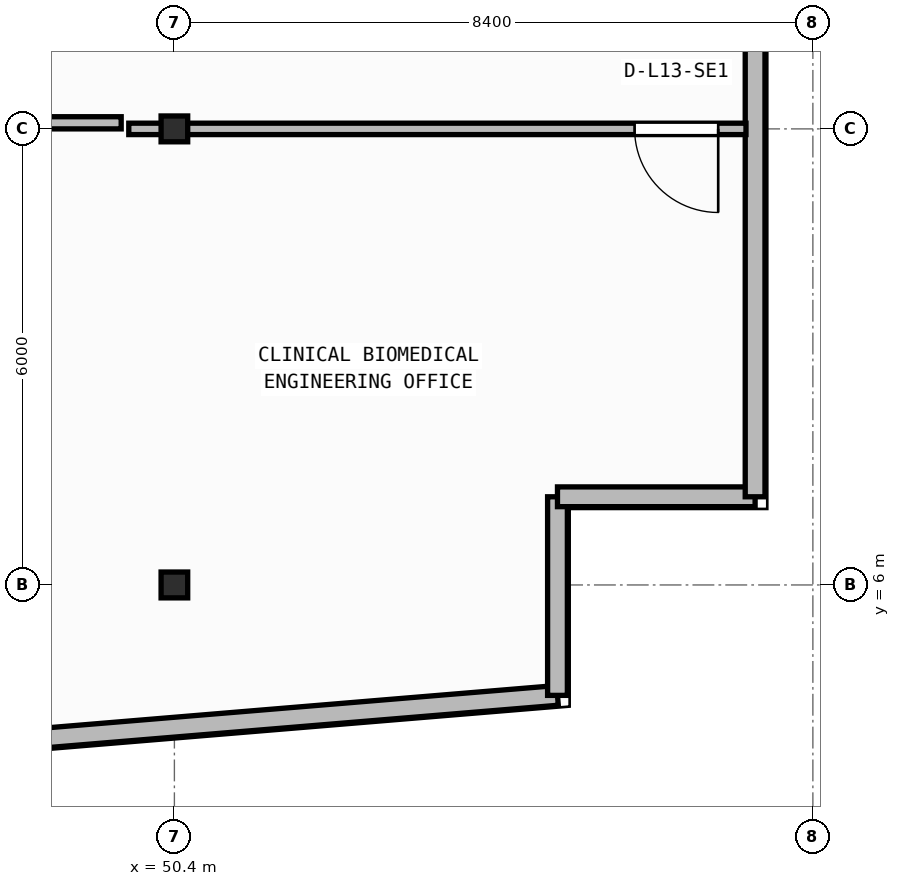
"""IFC4 building model, lengths in metres.
Left out: names, types, materials, properties, quantities, classifications, styles, units other than length and angle.
Written with IfcOpenShell. Run it as: python <this file> out.ifc"""

import sys

from ifc_helpers import new_model, si_unit, direction, frame, frame_2d, origin, origin_2d, place, context, subcontext, project, spatial, rectangle, i_section, extrude, element, fill, save


model = new_model("IFC4")
c1 = context("Model", 3, precision=1e-05, world=origin(), true_north=direction((0.0, 1.0)))
c2 = subcontext(c1, "Body", "Model", "MODEL_VIEW")
j1 = project(units=[si_unit("LENGTHUNIT", "METRE"), si_unit("PLANEANGLEUNIT", "RADIAN")], contexts=[c1])
p1 = place(None, origin())
s1 = spatial("IfcSite", under=j1, at=p1, CompositionType="ELEMENT")
p2 = place(p1, origin())
s2 = spatial("IfcBuilding", under=s1, at=p2, CompositionType="ELEMENT")
p3 = place(p2, frame((0.0, 0.0, 54.1)))
s3 = spatial("IfcBuildingStorey", under=s2, at=p3, CompositionType="ELEMENT", Elevation=54.1)
for number, where, z_axis, x_axis in (
    (1, (50.4, 6.0, 0.0), (0.0, 0.0, 1.0), (1.0, 0.0, 0.0)),
    (2, (50.4, 12.0, 0.0), (0.0, 0.0, 1.0), (1.0, 0.0, 0.0)),
):
    element("IfcColumn", number, at=place(p3, frame(where, z_axis=z_axis, x_axis=x_axis)), inside=s3, PredefinedType="COLUMN", context=c2, shape_type="SweptSolid", body=[
        extrude(i_section(OverallWidth=0.35, OverallDepth=0.34, WebThickness=0.016, FlangeThickness=0.028, at=origin_2d()), origin(), (0.0, 0.0, 1.0), 3.95),
    ])
p4 = place(p3, frame((2.76, 0.174, 0.0), z_axis=(0.0, 0.0, 1.0), x_axis=(0.996571478456, 0.082736257641, 0.0)))
e3 = element("IfcWall", 3, at=p4, inside=s3, PredefinedType="STANDARD", context=c2, shape_type="SweptSolid", body=[
    extrude(rectangle(XDim=52.861, YDim=0.26, at=frame_2d((26.431, 0.0))), origin(), (0.0, 0.0, 1.0), 3.71),
])
p5 = place(p4, frame((25.231, 0.0, 0.9)))
e4 = element("IfcOpeningElement", 4, at=p5, cuts=e3, PredefinedType="OPENING", context=c2, shape_type="SweptSolid", body=[
    extrude(rectangle(XDim=2.4, YDim=1.65, at=frame_2d((1.2, 0.825))), frame((0.0, 0.14, 0.0), z_axis=(0.0, -1.0, 0.0), x_axis=(1.0, 0.0, 0.0)), (0.0, 0.0, 1.0), 0.28),
])
p6 = place(p3, frame((55.44, 4.547, 0.0), z_axis=(0.0, 0.0, 1.0), x_axis=(0.0, 1.0, 0.0)))
e5 = element("IfcWall", 5, at=p6, inside=s3, PredefinedType="STANDARD", context=c2, shape_type="SweptSolid", body=[
    extrude(rectangle(XDim=2.613, YDim=0.26, at=frame_2d((1.306, 0.0))), origin(), (0.0, 0.0, 1.0), 3.71),
])
p7 = place(p3, frame((55.44, 7.16, 0.0), z_axis=(0.0, 0.0, 1.0), x_axis=(1.0, 0.0, 0.0)))
e6 = element("IfcWall", 6, at=p7, inside=s3, PredefinedType="STANDARD", context=c2, shape_type="SweptSolid", body=[
    extrude(rectangle(XDim=2.6, YDim=0.26, at=frame_2d((1.3, 0.0))), origin(), (0.0, 0.0, 1.0), 3.71),
])
p8 = place(p3, frame((58.04, 7.16, 0.0), z_axis=(0.0, 0.0, 1.0), x_axis=(0.0, 1.0, 0.0)))
e7 = element("IfcWall", 7, at=p8, inside=s3, PredefinedType="STANDARD", context=c2, shape_type="SweptSolid", body=[
    extrude(rectangle(XDim=24.48, YDim=0.26, at=frame_2d((12.24, 0.0))), origin(), (0.0, 0.0, 1.0), 3.71),
])
p9 = place(p8, frame((13.44, 0.0, 0.0)))
e8 = element("IfcOpeningElement", 8, at=p9, cuts=e7, PredefinedType="OPENING", context=c2, shape_type="SweptSolid", body=[
    extrude(rectangle(XDim=1.3, YDim=2.15, at=frame_2d((0.65, 1.075))), frame((0.0, 0.14, 0.0), z_axis=(0.0, -1.0, 0.0), x_axis=(1.0, 0.0, 0.0)), (0.0, 0.0, 1.0), 0.28),
])
p10 = place(p8, frame((8.65, 0.0, 0.9)))
e9 = element("IfcOpeningElement", 9, at=p10, cuts=e7, PredefinedType="OPENING", context=c2, shape_type="SweptSolid", body=[
    extrude(rectangle(XDim=2.4, YDim=1.65, at=frame_2d((1.2, 0.825))), frame((0.0, 0.14, 0.0), z_axis=(0.0, -1.0, 0.0), x_axis=(1.0, 0.0, 0.0)), (0.0, 0.0, 1.0), 0.28),
])
p11 = place(p3, frame((57.92, 12.0, 0.0), z_axis=(0.0, 0.0, 1.0), x_axis=(-1.0, 0.0, 0.0)))
e10 = element("IfcWall", 10, at=p11, inside=s3, PredefinedType="PARTITIONING", context=c2, shape_type="SweptSolid", body=[
    extrude(rectangle(XDim=8.12, YDim=0.15, at=frame_2d((4.06, 0.0))), origin(), (0.0, 0.0, 1.0), 3.073),
])
p12 = place(p11, frame((0.365, 0.0, 0.0)))
e11 = element("IfcOpeningElement", 11, at=p12, cuts=e10, PredefinedType="OPENING", context=c2, shape_type="SweptSolid", body=[
    extrude(rectangle(XDim=1.1, YDim=2.1, at=frame_2d((0.55, 1.05))), frame((0.0, 0.085, 0.0), z_axis=(0.0, -1.0, 0.0), x_axis=(1.0, 0.0, 0.0)), (0.0, 0.0, 1.0), 0.17),
])
p13 = place(p3, frame((46.689, 12.08, 0.0), z_axis=(0.0, 0.0, 1.0), x_axis=(1.0, 0.0, 0.0)))
e12 = element("IfcWall", 12, at=p13, inside=s3, PredefinedType="PARTITIONING", context=c2, shape_type="SweptSolid", body=[
    extrude(rectangle(XDim=3.011, YDim=0.16, at=frame_2d((1.505, 0.0))), origin(), (0.0, 0.0, 1.0), 3.073),
])
p14 = place(p12, origin())
e13 = element("IfcDoor", 13, at=p14, inside=s3, OperationType="SINGLE_SWING_LEFT", PredefinedType="DOOR", context=c2, shape_type="SweptSolid", body=[
    extrude(rectangle(XDim=1.1, YDim=2.1, at=frame_2d((0.55, 1.05))), frame((0.0, 0.025, 0.0), z_axis=(0.0, -1.0, 0.0), x_axis=(1.0, 0.0, 0.0)), (0.0, 0.0, 1.0), 0.05),
])
fill(e11, e13)
save(model, sys.argv[1])
